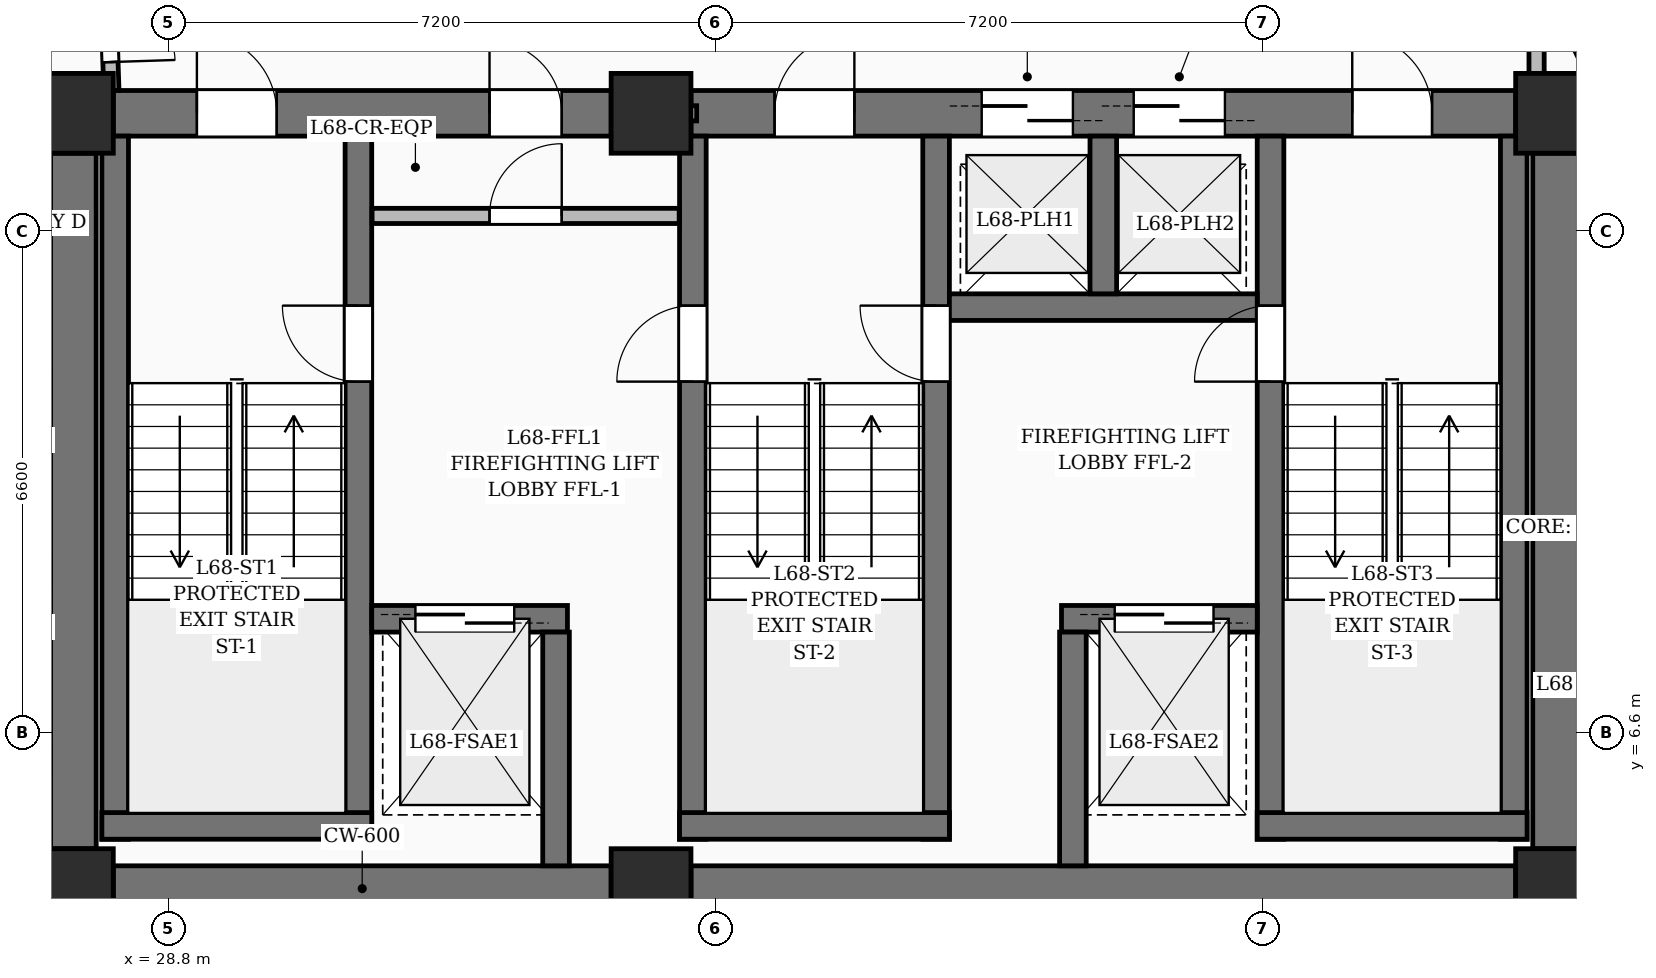
"""IFC4 building model, lengths in metres.
Left out: names, types, materials, properties, quantities, classifications, styles, units other than length and angle.
Written with IfcOpenShell. Run it as: python <this file> out.ifc"""

import sys

from ifc_helpers import new_model, si_unit, direction, frame, frame_2d, origin, origin_2d, place, context, subcontext, project, spatial, rectangle, extrude, element, fill, save


model = new_model("IFC4")
c1 = context("Model", 3, precision=1e-05, world=origin(), true_north=direction((0.0, 1.0)))
c2 = subcontext(c1, "Body", "Model", "MODEL_VIEW")
j1 = project(units=[si_unit("LENGTHUNIT", "METRE"), si_unit("PLANEANGLEUNIT", "RADIAN")], contexts=[c1])
p1 = place(None, origin())
s1 = spatial("IfcSite", under=j1, at=p1, CompositionType="ELEMENT")
p2 = place(p1, origin())
s2 = spatial("IfcBuilding", under=s1, at=p2, CompositionType="ELEMENT")
p3 = place(p2, frame((0.0, 0.0, 263.25)))
s3 = spatial("IfcBuildingStorey", under=s2, at=p3, CompositionType="ELEMENT", Elevation=263.25)
for number, where, z_axis, x_axis in (
    (1, (27.55, 4.55, 0.0), (0.0, 0.0, 1.0), (1.0, 0.0, 0.0)),
    (2, (35.15, 4.55, 0.0), (0.0, 0.0, 1.0), (1.0, 0.0, 0.0)),
    (3, (47.05, 4.55, 0.0), (0.0, 0.0, 1.0), (1.0, 0.0, 0.0)),
    (4, (27.55, 14.75, 0.0), (0.0, 0.0, 1.0), (1.0, 0.0, 0.0)),
    (5, (35.15, 14.75, 0.0), (0.0, 0.0, 1.0), (1.0, 0.0, 0.0)),
    (6, (47.05, 14.75, 0.0), (0.0, 0.0, 1.0), (1.0, 0.0, 0.0)),
):
    element("IfcColumn", number, at=place(p3, frame(where, z_axis=z_axis, x_axis=x_axis)), inside=s3, PredefinedType="COLUMN", context=c2, shape_type="SweptSolid", body=[
        extrude(rectangle(XDim=1.05, YDim=1.05, at=origin_2d()), origin(), (0.0, 0.0, 1.0), 3.75),
    ])
p4 = place(p3, frame((28.075, 4.55, 0.0), z_axis=(0.0, 0.0, 1.0), x_axis=(1.0, 0.0, 0.0)))
e7 = element("IfcWall", 7, at=p4, inside=s3, PredefinedType="SHEAR", context=c2, shape_type="SweptSolid", body=[
    extrude(rectangle(XDim=6.55, YDim=0.6, at=frame_2d((3.275, 0.0))), origin(), (0.0, 0.0, 1.0), 3.75),
])
p5 = place(p3, frame((35.675, 4.55, 0.0), z_axis=(0.0, 0.0, 1.0), x_axis=(1.0, 0.0, 0.0)))
e8 = element("IfcWall", 8, at=p5, inside=s3, PredefinedType="SHEAR", context=c2, shape_type="SweptSolid", body=[
    extrude(rectangle(XDim=10.85, YDim=0.6, at=frame_2d((5.425, 0.0))), origin(), (0.0, 0.0, 1.0), 3.75),
])
p6 = place(p3, frame((28.075, 14.75, 0.0), z_axis=(0.0, 0.0, 1.0), x_axis=(1.0, 0.0, 0.0)))
e9 = element("IfcWall", 9, at=p6, inside=s3, PredefinedType="SHEAR", context=c2, shape_type="SweptSolid", body=[
    extrude(rectangle(XDim=6.55, YDim=0.6, at=frame_2d((3.275, 0.0))), origin(), (0.0, 0.0, 1.0), 3.75),
])
p7 = place(p6, frame((1.1, 0.0, 0.0)))
e10 = element("IfcOpeningElement", 10, at=p7, cuts=e9, PredefinedType="OPENING", context=c2, shape_type="SweptSolid", body=[
    extrude(rectangle(XDim=1.05, YDim=2.15, at=frame_2d((0.525, 1.075))), frame((0.0, 0.31, 0.0), z_axis=(0.0, -1.0, 0.0), x_axis=(1.0, 0.0, 0.0)), (0.0, 0.0, 1.0), 0.62),
])
p8 = place(p6, frame((4.95, 0.0, 0.0)))
e11 = element("IfcOpeningElement", 11, at=p8, cuts=e9, PredefinedType="OPENING", context=c2, shape_type="SweptSolid", body=[
    extrude(rectangle(XDim=0.95, YDim=2.15, at=frame_2d((0.475, 1.075))), frame((0.0, 0.31, 0.0), z_axis=(0.0, -1.0, 0.0), x_axis=(1.0, 0.0, 0.0)), (0.0, 0.0, 1.0), 0.62),
])
p9 = place(p3, frame((35.675, 14.75, 0.0), z_axis=(0.0, 0.0, 1.0), x_axis=(1.0, 0.0, 0.0)))
e12 = element("IfcWall", 12, at=p9, inside=s3, PredefinedType="SHEAR", context=c2, shape_type="SweptSolid", body=[
    extrude(rectangle(XDim=10.85, YDim=0.6, at=frame_2d((5.425, 0.0))), origin(), (0.0, 0.0, 1.0), 3.75),
])
p10 = place(p9, frame((1.1, 0.0, 0.0)))
e13 = element("IfcOpeningElement", 13, at=p10, cuts=e12, PredefinedType="OPENING", context=c2, shape_type="SweptSolid", body=[
    extrude(rectangle(XDim=1.05, YDim=2.15, at=frame_2d((0.525, 1.075))), frame((0.0, 0.31, 0.0), z_axis=(0.0, -1.0, 0.0), x_axis=(1.0, 0.0, 0.0)), (0.0, 0.0, 1.0), 0.62),
])
p11 = place(p9, frame((8.7, 0.0, 0.0)))
e14 = element("IfcOpeningElement", 14, at=p11, cuts=e12, PredefinedType="OPENING", context=c2, shape_type="SweptSolid", body=[
    extrude(rectangle(XDim=1.05, YDim=2.15, at=frame_2d((0.525, 1.075))), frame((0.0, 0.31, 0.0), z_axis=(0.0, -1.0, 0.0), x_axis=(1.0, 0.0, 0.0)), (0.0, 0.0, 1.0), 0.62),
])
p12 = place(p9, frame((3.825, 0.0, 0.0)))
e15 = element("IfcOpeningElement", 15, at=p12, cuts=e12, PredefinedType="OPENING", context=c2, shape_type="SweptSolid", body=[
    extrude(rectangle(XDim=1.2, YDim=2.2, at=frame_2d((0.6, 1.1))), frame((0.0, 0.31, 0.0), z_axis=(0.0, -1.0, 0.0), x_axis=(1.0, 0.0, 0.0)), (0.0, 0.0, 1.0), 0.62),
])
p13 = place(p9, frame((5.825, 0.0, 0.0)))
e16 = element("IfcOpeningElement", 16, at=p13, cuts=e12, PredefinedType="OPENING", context=c2, shape_type="SweptSolid", body=[
    extrude(rectangle(XDim=1.2, YDim=2.2, at=frame_2d((0.6, 1.1))), frame((0.0, 0.31, 0.0), z_axis=(0.0, -1.0, 0.0), x_axis=(1.0, 0.0, 0.0)), (0.0, 0.0, 1.0), 0.62),
])
for number, where, z_axis, x_axis in (
    (17, (27.55, 5.075, 0.0), (0.0, 0.0, 1.0), (0.0, 1.0, 0.0)),
    (18, (47.05, 5.075, 0.0), (0.0, 0.0, 1.0), (0.0, 1.0, 0.0)),
):
    element("IfcWall", number, at=place(p3, frame(where, z_axis=z_axis, x_axis=x_axis)), inside=s3, PredefinedType="SHEAR", context=c2, shape_type="SweptSolid", body=[
        extrude(rectangle(XDim=9.15, YDim=0.6, at=frame_2d((4.575, 0.0))), origin(), (0.0, 0.0, 1.0), 3.75),
    ])
p14 = place(p3, frame((28.1, 5.2, 0.0), z_axis=(0.0, 0.0, 1.0), x_axis=(0.0, 1.0, 0.0)))
e19 = element("IfcWall", 19, at=p14, inside=s3, PredefinedType="SOLIDWALL", context=c2, shape_type="SweptSolid", body=[
    extrude(rectangle(XDim=9.25, YDim=0.35, at=frame_2d((4.625, 0.0))), origin(), (0.0, 0.0, 1.0), 3.75),
])
p15 = place(p3, frame((31.3, 5.2, 0.0), z_axis=(0.0, 0.0, 1.0), x_axis=(0.0, 1.0, 0.0)))
e20 = element("IfcWall", 20, at=p15, inside=s3, PredefinedType="SOLIDWALL", context=c2, shape_type="SweptSolid", body=[
    extrude(rectangle(XDim=9.25, YDim=0.35, at=frame_2d((4.625, 0.0))), origin(), (0.0, 0.0, 1.0), 3.75),
])
p16 = place(p15, frame((6.02, 0.0, 0.0)))
e21 = element("IfcOpeningElement", 21, at=p16, cuts=e20, PredefinedType="OPENING", context=c2, shape_type="SweptSolid", body=[
    extrude(rectangle(XDim=1.0, YDim=2.15, at=frame_2d((0.5, 1.075))), frame((0.0, 0.185, 0.0), z_axis=(0.0, -1.0, 0.0), x_axis=(1.0, 0.0, 0.0)), (0.0, 0.0, 1.0), 0.37),
])
p17 = place(p3, frame((27.925, 5.375, 0.0), z_axis=(0.0, 0.0, 1.0), x_axis=(1.0, 0.0, 0.0)))
e22 = element("IfcWall", 22, at=p17, inside=s3, PredefinedType="SOLIDWALL", context=c2, shape_type="SweptSolid", body=[
    extrude(rectangle(XDim=3.55, YDim=0.35, at=frame_2d((1.775, 0.0))), origin(), (0.0, 0.0, 1.0), 3.75),
])
p18 = place(p3, frame((35.7, 5.2, 0.0), z_axis=(0.0, 0.0, 1.0), x_axis=(0.0, 1.0, 0.0)))
e23 = element("IfcWall", 23, at=p18, inside=s3, PredefinedType="SOLIDWALL", context=c2, shape_type="SweptSolid", body=[
    extrude(rectangle(XDim=9.25, YDim=0.35, at=frame_2d((4.625, 0.0))), origin(), (0.0, 0.0, 1.0), 3.75),
])
p19 = place(p18, frame((6.02, 0.0, 0.0)))
e24 = element("IfcOpeningElement", 24, at=p19, cuts=e23, PredefinedType="OPENING", context=c2, shape_type="SweptSolid", body=[
    extrude(rectangle(XDim=1.0, YDim=2.15, at=frame_2d((0.5, 1.075))), frame((0.0, 0.185, 0.0), z_axis=(0.0, -1.0, 0.0), x_axis=(1.0, 0.0, 0.0)), (0.0, 0.0, 1.0), 0.37),
])
p20 = place(p3, frame((38.9, 5.2, 0.0), z_axis=(0.0, 0.0, 1.0), x_axis=(0.0, 1.0, 0.0)))
e25 = element("IfcWall", 25, at=p20, inside=s3, PredefinedType="SOLIDWALL", context=c2, shape_type="SweptSolid", body=[
    extrude(rectangle(XDim=9.25, YDim=0.35, at=frame_2d((4.625, 0.0))), origin(), (0.0, 0.0, 1.0), 3.75),
])
p21 = place(p20, frame((6.02, 0.0, 0.0)))
e26 = element("IfcOpeningElement", 26, at=p21, cuts=e25, PredefinedType="OPENING", context=c2, shape_type="SweptSolid", body=[
    extrude(rectangle(XDim=1.0, YDim=2.15, at=frame_2d((0.5, 1.075))), frame((0.0, 0.185, 0.0), z_axis=(0.0, -1.0, 0.0), x_axis=(1.0, 0.0, 0.0)), (0.0, 0.0, 1.0), 0.37),
])
p22 = place(p3, frame((35.525, 5.375, 0.0), z_axis=(0.0, 0.0, 1.0), x_axis=(1.0, 0.0, 0.0)))
e27 = element("IfcWall", 27, at=p22, inside=s3, PredefinedType="SOLIDWALL", context=c2, shape_type="SweptSolid", body=[
    extrude(rectangle(XDim=3.55, YDim=0.35, at=frame_2d((1.775, 0.0))), origin(), (0.0, 0.0, 1.0), 3.75),
])
p23 = place(p3, frame((43.3, 5.2, 0.0), z_axis=(0.0, 0.0, 1.0), x_axis=(0.0, 1.0, 0.0)))
e28 = element("IfcWall", 28, at=p23, inside=s3, PredefinedType="SOLIDWALL", context=c2, shape_type="SweptSolid", body=[
    extrude(rectangle(XDim=9.25, YDim=0.35, at=frame_2d((4.625, 0.0))), origin(), (0.0, 0.0, 1.0), 3.75),
])
p24 = place(p23, frame((6.02, 0.0, 0.0)))
e29 = element("IfcOpeningElement", 29, at=p24, cuts=e28, PredefinedType="OPENING", context=c2, shape_type="SweptSolid", body=[
    extrude(rectangle(XDim=1.0, YDim=2.15, at=frame_2d((0.5, 1.075))), frame((0.0, 0.185, 0.0), z_axis=(0.0, -1.0, 0.0), x_axis=(1.0, 0.0, 0.0)), (0.0, 0.0, 1.0), 0.37),
])
p25 = place(p3, frame((46.5, 5.2, 0.0), z_axis=(0.0, 0.0, 1.0), x_axis=(0.0, 1.0, 0.0)))
e30 = element("IfcWall", 30, at=p25, inside=s3, PredefinedType="SOLIDWALL", context=c2, shape_type="SweptSolid", body=[
    extrude(rectangle(XDim=9.25, YDim=0.35, at=frame_2d((4.625, 0.0))), origin(), (0.0, 0.0, 1.0), 3.75),
])
p26 = place(p3, frame((43.125, 5.375, 0.0), z_axis=(0.0, 0.0, 1.0), x_axis=(1.0, 0.0, 0.0)))
e31 = element("IfcWall", 31, at=p26, inside=s3, PredefinedType="SOLIDWALL", context=c2, shape_type="SweptSolid", body=[
    extrude(rectangle(XDim=3.55, YDim=0.35, at=frame_2d((1.775, 0.0))), origin(), (0.0, 0.0, 1.0), 3.75),
])
p27 = place(p3, frame((31.475, 8.1, 0.0), z_axis=(0.0, 0.0, 1.0), x_axis=(1.0, 0.0, 0.0)))
e32 = element("IfcWall", 32, at=p27, inside=s3, PredefinedType="SOLIDWALL", context=c2, shape_type="SweptSolid", body=[
    extrude(rectangle(XDim=2.575, YDim=0.35, at=frame_2d((1.288, 0.0))), origin(), (0.0, 0.0, 1.0), 3.75),
])
p28 = place(p27, frame((0.575, 0.0, 0.0)))
e33 = element("IfcOpeningElement", 33, at=p28, cuts=e32, PredefinedType="OPENING", context=c2, shape_type="SweptSolid", body=[
    extrude(rectangle(XDim=1.3, YDim=2.25, at=frame_2d((0.65, 1.125))), frame((0.0, 0.185, 0.0), z_axis=(0.0, -1.0, 0.0), x_axis=(1.0, 0.0, 0.0)), (0.0, 0.0, 1.0), 0.37),
])
p29 = place(p3, frame((40.55, 8.1, 0.0), z_axis=(0.0, 0.0, 1.0), x_axis=(1.0, 0.0, 0.0)))
e34 = element("IfcWall", 34, at=p29, inside=s3, PredefinedType="SOLIDWALL", context=c2, shape_type="SweptSolid", body=[
    extrude(rectangle(XDim=2.575, YDim=0.35, at=frame_2d((1.288, 0.0))), origin(), (0.0, 0.0, 1.0), 3.75),
])
p30 = place(p29, frame((0.7, 0.0, 0.0)))
e35 = element("IfcOpeningElement", 35, at=p30, cuts=e34, PredefinedType="OPENING", context=c2, shape_type="SweptSolid", body=[
    extrude(rectangle(XDim=1.3, YDim=2.25, at=frame_2d((0.65, 1.125))), frame((0.0, 0.185, 0.0), z_axis=(0.0, -1.0, 0.0), x_axis=(1.0, 0.0, 0.0)), (0.0, 0.0, 1.0), 0.37),
])
for number, where, z_axis, x_axis in (
    (36, (33.9, 4.85, 0.0), (0.0, 0.0, 1.0), (0.0, 1.0, 0.0)),
    (37, (40.7, 4.85, 0.0), (0.0, 0.0, 1.0), (0.0, 1.0, 0.0)),
):
    element("IfcWall", number, at=place(p3, frame(where, z_axis=z_axis, x_axis=x_axis)), inside=s3, PredefinedType="SOLIDWALL", context=c2, shape_type="SweptSolid", body=[
        extrude(rectangle(XDim=3.075, YDim=0.35, at=frame_2d((1.538, 0.0))), origin(), (0.0, 0.0, 1.0), 3.75),
    ])
p31 = place(p3, frame((39.075, 12.2, 0.0), z_axis=(0.0, 0.0, 1.0), x_axis=(1.0, 0.0, 0.0)))
e38 = element("IfcWall", 38, at=p31, inside=s3, PredefinedType="SOLIDWALL", context=c2, shape_type="SweptSolid", body=[
    extrude(rectangle(XDim=4.05, YDim=0.35, at=frame_2d((2.025, 0.0))), origin(), (0.0, 0.0, 1.0), 3.75),
])
p32 = place(p3, frame((41.1, 12.375, 0.0), z_axis=(0.0, 0.0, 1.0), x_axis=(0.0, 1.0, 0.0)))
e39 = element("IfcWall", 39, at=p32, inside=s3, PredefinedType="SOLIDWALL", context=c2, shape_type="SweptSolid", body=[
    extrude(rectangle(XDim=2.075, YDim=0.35, at=frame_2d((1.038, 0.0))), origin(), (0.0, 0.0, 1.0), 3.75),
])
p33 = place(p3, frame((34.72, 14.75, 0.0), z_axis=(0.0, 0.0, 1.0), x_axis=(1.0, 0.0, 0.0)))
e40 = element("IfcWall", 40, at=p33, inside=s3, PredefinedType="PARTITIONING", context=c2, shape_type="SweptSolid", body=[
    extrude(rectangle(XDim=1.03, YDim=0.2, at=frame_2d((0.515, 0.0))), origin(), (0.0, 0.0, 1.0), 2.685),
])
p34 = place(p3, frame((31.48, 13.4, 0.0), z_axis=(0.0, 0.0, 1.0), x_axis=(1.0, 0.0, 0.0)))
e41 = element("IfcWall", 41, at=p34, inside=s3, PredefinedType="PARTITIONING", context=c2, shape_type="SweptSolid", body=[
    extrude(rectangle(XDim=4.04, YDim=0.2, at=frame_2d((2.02, 0.0))), origin(), (0.0, 0.0, 1.0), 3.5),
])
p35 = place(p34, frame((1.545, 0.0, 0.0)))
e42 = element("IfcOpeningElement", 42, at=p35, cuts=e41, PredefinedType="OPENING", context=c2, shape_type="SweptSolid", body=[
    extrude(rectangle(XDim=0.95, YDim=2.15, at=frame_2d((0.475, 1.075))), frame((0.0, 0.11, 0.0), z_axis=(0.0, -1.0, 0.0), x_axis=(1.0, 0.0, 0.0)), (0.0, 0.0, 1.0), 0.22),
])
p36 = place(p3, frame((46.8, 15.05, 0.0), z_axis=(0.0, 0.0, 1.0), x_axis=(0.0, 1.0, 0.0)))
e43 = element("IfcWall", 43, at=p36, inside=s3, PredefinedType="PARTITIONING", context=c2, shape_type="SweptSolid", body=[
    extrude(rectangle(XDim=1.308, YDim=0.2, at=frame_2d((0.654, 0.0))), origin(), (0.0, 0.0, 1.0), 2.685),
])
p37 = place(p3, frame((27.975, 17.35, 0.0), z_axis=(0.0, 0.0, 1.0), x_axis=(0.032569486082, -0.999469473559, 0.0)))
e44 = element("IfcWall", 44, at=p37, inside=s3, PredefinedType="PARTITIONING", context=c2, shape_type="SweptSolid", body=[
    extrude(rectangle(XDim=2.301, YDim=0.2, at=frame_2d((1.151, 0.0))), origin(), (0.0, 0.0, 1.0), 3.5),
])
p38 = place(p37, frame((1.077, 0.0, 0.0)))
e45 = element("IfcOpeningElement", 45, at=p38, cuts=e44, PredefinedType="OPENING", context=c2, shape_type="SweptSolid", body=[
    extrude(rectangle(XDim=0.85, YDim=2.1, at=frame_2d((0.425, 1.05))), frame((0.0, 0.11, 0.0), z_axis=(0.0, -1.0, 0.0), x_axis=(1.0, 0.0, 0.0)), (0.0, 0.0, 1.0), 0.22),
])
p39 = place(p3, frame((53.334, 3.249, 0.0), z_axis=(0.0, 0.0, 1.0), x_axis=(-0.433800998141, 0.901008709176, 0.0)))
e46 = element("IfcWall", 46, at=p39, inside=s3, PredefinedType="PARTITIONING", context=c2, shape_type="SweptSolid", body=[
    extrude(rectangle(XDim=15.062, YDim=0.175, at=frame_2d((7.531, 0.0))), origin(), (0.0, 0.0, 1.0), 2.764),
])
p40 = place(p39, frame((6.58, 0.0, 0.0)))
e47 = element("IfcOpeningElement", 47, at=p40, cuts=e46, PredefinedType="OPENING", context=c2, shape_type="SweptSolid", body=[
    extrude(rectangle(XDim=0.95, YDim=2.2, at=frame_2d((0.475, 1.1))), frame((0.0, 0.097, 0.0), z_axis=(0.0, -1.0, 0.0), x_axis=(1.0, 0.0, 0.0)), (0.0, 0.0, 1.0), 0.195),
])
p41 = place(p7, origin())
e48 = element("IfcDoor", 48, at=p41, inside=s3, OperationType="SINGLE_SWING_LEFT", PredefinedType="DOOR", context=c2, shape_type="SweptSolid", body=[
    extrude(rectangle(XDim=1.05, YDim=2.15, at=frame_2d((0.525, 1.075))), frame((0.0, 0.025, 0.0), z_axis=(0.0, -1.0, 0.0), x_axis=(1.0, 0.0, 0.0)), (0.0, 0.0, 1.0), 0.05),
])
fill(e10, e48)
p42 = place(p10, origin())
e49 = element("IfcDoor", 49, at=p42, inside=s3, OperationType="SINGLE_SWING_RIGHT", PredefinedType="DOOR", context=c2, shape_type="SweptSolid", body=[
    extrude(rectangle(XDim=1.05, YDim=2.15, at=frame_2d((0.525, 1.075))), frame((0.0, 0.025, 0.0), z_axis=(0.0, -1.0, 0.0), x_axis=(1.0, 0.0, 0.0)), (0.0, 0.0, 1.0), 0.05),
])
fill(e13, e49)
p43 = place(p11, origin())
e50 = element("IfcDoor", 50, at=p43, inside=s3, OperationType="SINGLE_SWING_LEFT", PredefinedType="DOOR", context=c2, shape_type="SweptSolid", body=[
    extrude(rectangle(XDim=1.05, YDim=2.15, at=frame_2d((0.525, 1.075))), frame((0.0, 0.025, 0.0), z_axis=(0.0, -1.0, 0.0), x_axis=(1.0, 0.0, 0.0)), (0.0, 0.0, 1.0), 0.05),
])
fill(e14, e50)
p44 = place(p16, origin())
e51 = element("IfcDoor", 51, at=p44, inside=s3, OperationType="SINGLE_SWING_RIGHT", PredefinedType="DOOR", context=c2, shape_type="SweptSolid", body=[
    extrude(rectangle(XDim=1.0, YDim=2.15, at=frame_2d((0.5, 1.075))), frame((0.0, 0.025, 0.0), z_axis=(0.0, -1.0, 0.0), x_axis=(1.0, 0.0, 0.0)), (0.0, 0.0, 1.0), 0.05),
])
fill(e21, e51)
p45 = place(p19, origin())
e52 = element("IfcDoor", 52, at=p45, inside=s3, OperationType="SINGLE_SWING_LEFT", PredefinedType="DOOR", context=c2, shape_type="SweptSolid", body=[
    extrude(rectangle(XDim=1.0, YDim=2.15, at=frame_2d((0.5, 1.075))), frame((0.0, 0.025, 0.0), z_axis=(0.0, -1.0, 0.0), x_axis=(1.0, 0.0, 0.0)), (0.0, 0.0, 1.0), 0.05),
])
fill(e24, e52)
p46 = place(p21, origin())
e53 = element("IfcDoor", 53, at=p46, inside=s3, OperationType="SINGLE_SWING_RIGHT", PredefinedType="DOOR", context=c2, shape_type="SweptSolid", body=[
    extrude(rectangle(XDim=1.0, YDim=2.15, at=frame_2d((0.5, 1.075))), frame((0.0, 0.025, 0.0), z_axis=(0.0, -1.0, 0.0), x_axis=(1.0, 0.0, 0.0)), (0.0, 0.0, 1.0), 0.05),
])
fill(e26, e53)
p47 = place(p24, origin())
e54 = element("IfcDoor", 54, at=p47, inside=s3, OperationType="SINGLE_SWING_LEFT", PredefinedType="DOOR", context=c2, shape_type="SweptSolid", body=[
    extrude(rectangle(XDim=1.0, YDim=2.15, at=frame_2d((0.5, 1.075))), frame((0.0, 0.025, 0.0), z_axis=(0.0, -1.0, 0.0), x_axis=(1.0, 0.0, 0.0)), (0.0, 0.0, 1.0), 0.05),
])
fill(e29, e54)
p48 = place(p28, origin())
e55 = element("IfcDoor", 55, at=p48, inside=s3, OperationType="DOUBLE_DOOR_SLIDING", PredefinedType="DOOR", context=c2, shape_type="SweptSolid", body=[
    extrude(rectangle(XDim=1.3, YDim=2.25, at=frame_2d((0.65, 1.125))), frame((0.0, 0.025, 0.0), z_axis=(0.0, -1.0, 0.0), x_axis=(1.0, 0.0, 0.0)), (0.0, 0.0, 1.0), 0.05),
])
fill(e33, e55)
p49 = place(p30, origin())
e56 = element("IfcDoor", 56, at=p49, inside=s3, OperationType="DOUBLE_DOOR_SLIDING", PredefinedType="DOOR", context=c2, shape_type="SweptSolid", body=[
    extrude(rectangle(XDim=1.3, YDim=2.25, at=frame_2d((0.65, 1.125))), frame((0.0, 0.025, 0.0), z_axis=(0.0, -1.0, 0.0), x_axis=(1.0, 0.0, 0.0)), (0.0, 0.0, 1.0), 0.05),
])
fill(e35, e56)
p50 = place(p12, origin())
e57 = element("IfcDoor", 57, at=p50, inside=s3, OperationType="DOUBLE_DOOR_SLIDING", PredefinedType="DOOR", context=c2, shape_type="SweptSolid", body=[
    extrude(rectangle(XDim=1.2, YDim=2.2, at=frame_2d((0.6, 1.1))), frame((0.0, 0.025, 0.0), z_axis=(0.0, -1.0, 0.0), x_axis=(1.0, 0.0, 0.0)), (0.0, 0.0, 1.0), 0.05),
])
fill(e15, e57)
p51 = place(p13, origin())
e58 = element("IfcDoor", 58, at=p51, inside=s3, OperationType="DOUBLE_DOOR_SLIDING", PredefinedType="DOOR", context=c2, shape_type="SweptSolid", body=[
    extrude(rectangle(XDim=1.2, YDim=2.2, at=frame_2d((0.6, 1.1))), frame((0.0, 0.025, 0.0), z_axis=(0.0, -1.0, 0.0), x_axis=(1.0, 0.0, 0.0)), (0.0, 0.0, 1.0), 0.05),
])
fill(e16, e58)
p52 = place(p35, origin())
e59 = element("IfcDoor", 59, at=p52, inside=s3, OperationType="SINGLE_SWING_RIGHT", PredefinedType="DOOR", context=c2, shape_type="SweptSolid", body=[
    extrude(rectangle(XDim=0.95, YDim=2.15, at=frame_2d((0.475, 1.075))), frame((0.0, 0.025, 0.0), z_axis=(0.0, -1.0, 0.0), x_axis=(1.0, 0.0, 0.0)), (0.0, 0.0, 1.0), 0.05),
])
fill(e42, e59)
p53 = place(p8, origin())
e60 = element("IfcDoor", 60, at=p53, inside=s3, OperationType="SINGLE_SWING_LEFT", PredefinedType="DOOR", context=c2, shape_type="SweptSolid", body=[
    extrude(rectangle(XDim=0.95, YDim=2.15, at=frame_2d((0.475, 1.075))), frame((0.0, 0.025, 0.0), z_axis=(0.0, -1.0, 0.0), x_axis=(1.0, 0.0, 0.0)), (0.0, 0.0, 1.0), 0.05),
])
fill(e11, e60)
p54 = place(p38, origin())
e61 = element("IfcDoor", 61, at=p54, inside=s3, OperationType="SINGLE_SWING_RIGHT", PredefinedType="DOOR", context=c2, shape_type="SweptSolid", body=[
    extrude(rectangle(XDim=0.85, YDim=2.1, at=frame_2d((0.425, 1.05))), frame((0.0, 0.025, 0.0), z_axis=(0.0, -1.0, 0.0), x_axis=(1.0, 0.0, 0.0)), (0.0, 0.0, 1.0), 0.05),
])
fill(e45, e61)
save(model, sys.argv[1])
